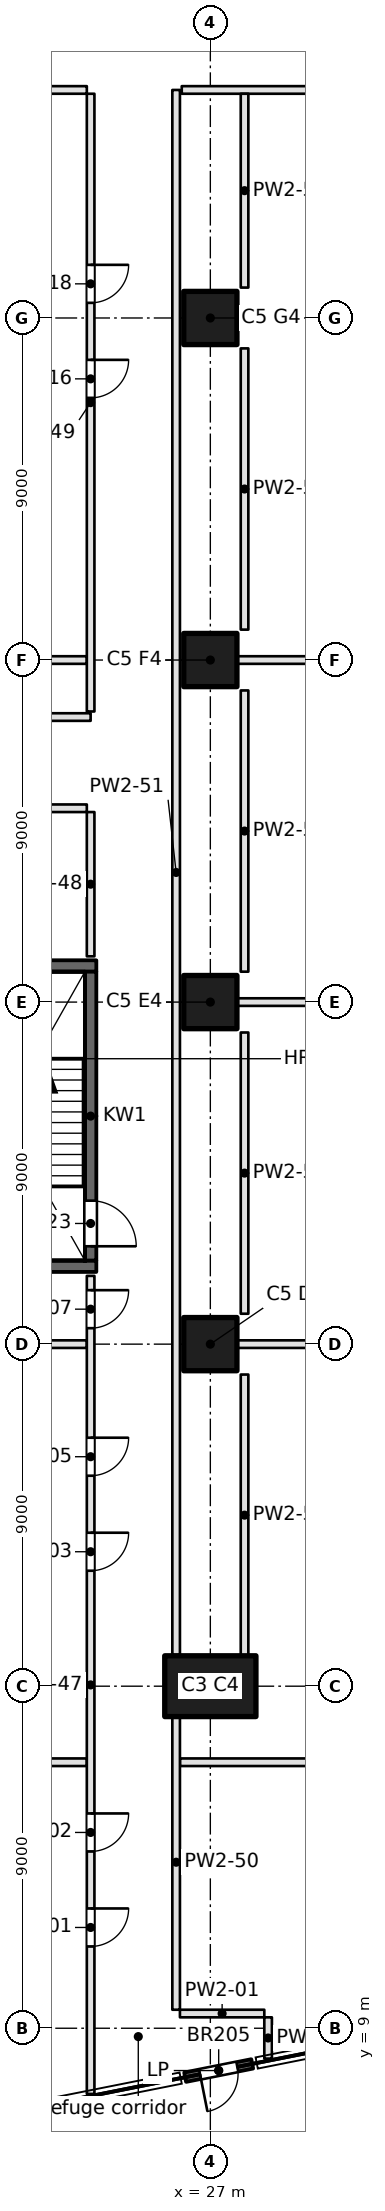
"""IFC4 building model, lengths in metres.
Left out: names, types, materials, properties, quantities, classifications, styles, units other than length and angle.
Written with IfcOpenShell. Run it as: python <this file> out.ifc"""

import sys

from ifc_helpers import new_model, si_unit, direction, frame, frame_2d, origin, origin_2d, place, context, subcontext, project, spatial, rectangle, extrude, element, fill, save


model = new_model("IFC4")
c1 = context("Model", 3, precision=1e-05, world=origin(), true_north=direction((0.0, 1.0)))
c2 = subcontext(c1, "Body", "Model", "MODEL_VIEW")
j1 = project(units=[si_unit("LENGTHUNIT", "METRE"), si_unit("PLANEANGLEUNIT", "RADIAN")], contexts=[c1])
p1 = place(None, origin())
s1 = spatial("IfcSite", under=j1, at=p1, CompositionType="ELEMENT")
p2 = place(p1, origin())
s2 = spatial("IfcBuilding", under=s1, at=p2, CompositionType="ELEMENT")
p3 = place(p2, frame((0.0, 0.0, 80.2)))
s3 = spatial("IfcBuildingStorey", under=s2, at=p3, CompositionType="ELEMENT", Elevation=80.2)
p4 = place(p3, frame((27.0, 18.0, 0.0), z_axis=(0.0, 0.0, 1.0), x_axis=(1.0, 0.0, 0.0)))
e1 = element("IfcColumn", 1, at=p4, inside=s3, PredefinedType="COLUMN", context=c2, shape_type="SweptSolid", body=[
    extrude(rectangle(XDim=2.4, YDim=1.6, at=origin_2d()), origin(), (0.0, 0.0, 1.0), 4.6),
])
for number, where, z_axis, x_axis in (
    (2, (27.0, 27.0, 0.0), (0.0, 0.0, 1.0), (1.0, 0.0, 0.0)),
    (3, (27.0, 36.0, 0.0), (0.0, 0.0, 1.0), (1.0, 0.0, 0.0)),
    (4, (27.0, 45.0, 0.0), (0.0, 0.0, 1.0), (1.0, 0.0, 0.0)),
    (5, (27.0, 54.0, 0.0), (0.0, 0.0, 1.0), (1.0, 0.0, 0.0)),
):
    element("IfcColumn", number, at=place(p3, frame(where, z_axis=z_axis, x_axis=x_axis)), inside=s3, PredefinedType="COLUMN", context=c2, shape_type="SweptSolid", body=[
        extrude(rectangle(XDim=1.4, YDim=1.4, at=origin_2d()), origin(), (0.0, 0.0, 1.0), 4.6),
    ])
p5 = place(p3, frame((26.337, 7.711, 0.0), z_axis=(0.0, 0.0, 1.0), x_axis=(0.98077319256, 0.195151081871, 0.0)))
e6 = element("IfcWall", 6, at=p5, inside=s3, PredefinedType="SOLIDWALL", context=c2, shape_type="SweptSolid", body=[
    extrude(rectangle(XDim=1.8, YDim=0.25, at=frame_2d((0.9, 0.0))), origin(), (0.0, 0.0, 1.0), 4.2),
])
p6 = place(p5, frame((0.4, 0.0, 0.0)))
e7 = element("IfcOpeningElement", 7, at=p6, cuts=e6, PredefinedType="OPENING", context=c2, shape_type="SweptSolid", body=[
    extrude(rectangle(XDim=1.0, YDim=2.1, at=frame_2d((0.5, 1.05))), frame((0.0, 0.125, 0.0), z_axis=(0.0, -1.0, 0.0), x_axis=(1.0, 0.0, 0.0)), (0.0, 0.0, 1.0), 0.25),
])
for number, where, z_axis, x_axis in (
    (8, (19.1, 29.05, -0.45), (0.0, 0.0, 1.0), (1.0, 0.0, 0.0)),
    (9, (19.1, 36.95, -0.45), (0.0, 0.0, 1.0), (1.0, 0.0, 0.0)),
):
    element("IfcWall", number, at=place(p3, frame(where, z_axis=z_axis, x_axis=x_axis)), inside=s3, PredefinedType="SOLIDWALL", context=c2, shape_type="SweptSolid", body=[
        extrude(rectangle(XDim=4.9, YDim=0.3, at=frame_2d((2.45, 0.0))), origin(), (0.0, 0.0, 1.0), 4.65),
    ])
p7 = place(p3, frame((23.85, 29.2, -0.45), z_axis=(0.0, 0.0, 1.0), x_axis=(0.0, 1.0, 0.0)))
e10 = element("IfcWall", 10, at=p7, inside=s3, PredefinedType="SOLIDWALL", context=c2, shape_type="SweptSolid", body=[
    extrude(rectangle(XDim=7.6, YDim=0.3, at=frame_2d((3.8, 0.0))), origin(), (0.0, 0.0, 1.0), 4.65),
])
p8 = place(p7, frame((0.375, 0.0, 0.45)))
e11 = element("IfcOpeningElement", 11, at=p8, cuts=e10, PredefinedType="OPENING", context=c2, shape_type="SweptSolid", body=[
    extrude(rectangle(XDim=1.2, YDim=2.1, at=frame_2d((0.6, 1.05))), frame((0.0, 0.15, 0.0), z_axis=(0.0, -1.0, 0.0), x_axis=(1.0, 0.0, 0.0)), (0.0, 0.0, 1.0), 0.3),
])
p9 = place(p3, frame((26.2, 9.387, 0.0), z_axis=(0.0, 0.0, 1.0), x_axis=(1.0, 0.0, 0.0)))
e12 = element("IfcWall", 12, at=p9, inside=s3, PredefinedType="PARTITIONING", context=c2, shape_type="SweptSolid", body=[
    extrude(rectangle(XDim=2.22, YDim=0.2, at=frame_2d((1.11, 0.0))), origin(), (0.0, 0.0, 1.0), 4.2),
])
p10 = place(p3, frame((9.162, 15.999, 0.0), z_axis=(0.0, 0.0, 1.0), x_axis=(1.0, 0.0, 0.0)))
e13 = element("IfcWall", 13, at=p10, inside=s3, PredefinedType="PARTITIONING", context=c2, shape_type="SweptSolid", body=[
    extrude(rectangle(XDim=14.588, YDim=0.2, at=frame_2d((7.294, 0.0))), origin(), (0.0, 0.0, 1.0), 4.2),
])
p11 = place(p3, frame((26.2, 15.999, 0.0), z_axis=(0.0, 0.0, 1.0), x_axis=(1.0, 0.0, 0.0)))
e14 = element("IfcWall", 14, at=p11, inside=s3, PredefinedType="PARTITIONING", context=c2, shape_type="SweptSolid", body=[
    extrude(rectangle(XDim=10.638, YDim=0.2, at=frame_2d((5.319, 0.0))), origin(), (0.0, 0.0, 1.0), 4.2),
])
p12 = place(p3, frame((18.65, 27.0, 0.0), z_axis=(0.0, 0.0, 1.0), x_axis=(1.0, 0.0, 0.0)))
e15 = element("IfcWall", 15, at=p12, inside=s3, PredefinedType="PARTITIONING", context=c2, shape_type="SweptSolid", body=[
    extrude(rectangle(XDim=5.1, YDim=0.2, at=frame_2d((2.55, 0.0))), origin(), (0.0, 0.0, 1.0), 4.2),
])
for number, where, z_axis, x_axis in (
    (16, (27.65, 27.0, 0.0), (0.0, 0.0, 1.0), (1.0, 0.0, 0.0)),
    (17, (27.65, 36.0, 0.0), (0.0, 0.0, 1.0), (1.0, 0.0, 0.0)),
):
    element("IfcWall", number, at=place(p3, frame(where, z_axis=z_axis, x_axis=x_axis)), inside=s3, PredefinedType="PARTITIONING", context=c2, shape_type="SweptSolid", body=[
        extrude(rectangle(XDim=7.7, YDim=0.2, at=frame_2d((3.85, 0.0))), origin(), (0.0, 0.0, 1.0), 4.2),
    ])
p13 = place(p3, frame((23.75, 41.1, 0.0), z_axis=(0.0, 0.0, 1.0), x_axis=(-1.0, 0.0, 0.0)))
e18 = element("IfcWall", 18, at=p13, inside=s3, PredefinedType="PARTITIONING", context=c2, shape_type="SweptSolid", body=[
    extrude(rectangle(XDim=14.65, YDim=0.2, at=frame_2d((7.325, 0.0))), origin(), (0.0, 0.0, 1.0), 4.2),
])
p14 = place(p13, frame((6.825, 0.0, 0.0)))
e19 = element("IfcOpeningElement", 19, at=p14, cuts=e18, PredefinedType="OPENING", context=c2, shape_type="SweptSolid", body=[
    extrude(rectangle(XDim=1.0, YDim=2.1, at=frame_2d((0.5, 1.05))), frame((0.0, 0.1, 0.0), z_axis=(0.0, -1.0, 0.0), x_axis=(1.0, 0.0, 0.0)), (0.0, 0.0, 1.0), 0.2),
])
p15 = place(p13, frame((4.325, 0.0, 0.0)))
e20 = element("IfcOpeningElement", 20, at=p15, cuts=e18, PredefinedType="OPENING", context=c2, shape_type="SweptSolid", body=[
    extrude(rectangle(XDim=1.0, YDim=2.1, at=frame_2d((0.5, 1.05))), frame((0.0, 0.1, 0.0), z_axis=(0.0, -1.0, 0.0), x_axis=(1.0, 0.0, 0.0)), (0.0, 0.0, 1.0), 0.2),
])
p16 = place(p3, frame((6.1, 43.5, 0.0), z_axis=(0.0, 0.0, 1.0), x_axis=(1.0, 0.0, 0.0)))
e21 = element("IfcWall", 21, at=p16, inside=s3, PredefinedType="PARTITIONING", context=c2, shape_type="SweptSolid", body=[
    extrude(rectangle(XDim=17.75, YDim=0.2, at=frame_2d((8.875, 0.0))), origin(), (0.0, 0.0, 1.0), 4.2),
])
p17 = place(p16, frame((5.875, 0.0, 0.0)))
e22 = element("IfcOpeningElement", 22, at=p17, cuts=e21, PredefinedType="OPENING", context=c2, shape_type="SweptSolid", body=[
    extrude(rectangle(XDim=1.0, YDim=2.1, at=frame_2d((0.5, 1.05))), frame((0.0, 0.1, 0.0), z_axis=(0.0, -1.0, 0.0), x_axis=(1.0, 0.0, 0.0)), (0.0, 0.0, 1.0), 0.2),
])
p18 = place(p16, frame((8.375, 0.0, 0.0)))
e23 = element("IfcOpeningElement", 23, at=p18, cuts=e21, PredefinedType="OPENING", context=c2, shape_type="SweptSolid", body=[
    extrude(rectangle(XDim=1.0, YDim=2.1, at=frame_2d((0.5, 1.05))), frame((0.0, 0.1, 0.0), z_axis=(0.0, -1.0, 0.0), x_axis=(1.0, 0.0, 0.0)), (0.0, 0.0, 1.0), 0.2),
])
p19 = place(p3, frame((18.65, 45.0, 0.0), z_axis=(0.0, 0.0, 1.0), x_axis=(1.0, 0.0, 0.0)))
e24 = element("IfcWall", 24, at=p19, inside=s3, PredefinedType="PARTITIONING", context=c2, shape_type="SweptSolid", body=[
    extrude(rectangle(XDim=5.1, YDim=0.2, at=frame_2d((2.55, 0.0))), origin(), (0.0, 0.0, 1.0), 4.2),
])
p20 = place(p3, frame((27.65, 45.0, 0.0), z_axis=(0.0, 0.0, 1.0), x_axis=(1.0, 0.0, 0.0)))
e25 = element("IfcWall", 25, at=p20, inside=s3, PredefinedType="PARTITIONING", context=c2, shape_type="SweptSolid", body=[
    extrude(rectangle(XDim=7.7, YDim=0.2, at=frame_2d((3.85, 0.0))), origin(), (0.0, 0.0, 1.0), 4.2),
])
p21 = place(p3, frame((23.75, 60.0, 0.0), z_axis=(0.0, 0.0, 1.0), x_axis=(-1.0, 0.0, 0.0)))
e26 = element("IfcWall", 26, at=p21, inside=s3, PredefinedType="PARTITIONING", context=c2, shape_type="SweptSolid", body=[
    extrude(rectangle(XDim=14.846, YDim=0.2, at=frame_2d((7.423, 0.0))), origin(), (0.0, 0.0, 1.0), 4.2),
])
p22 = place(p3, frame((40.1, 60.0, 0.0), z_axis=(0.0, 0.0, 1.0), x_axis=(-1.0, 0.0, 0.0)))
e27 = element("IfcWall", 27, at=p22, inside=s3, PredefinedType="PARTITIONING", context=c2, shape_type="SweptSolid", body=[
    extrude(rectangle(XDim=13.853, YDim=0.2, at=frame_2d((6.926, 0.0))), origin(), (0.0, 0.0, 1.0), 4.2),
])
p23 = place(p3, frame((23.85, 7.272, 0.0), z_axis=(0.0, 0.0, 1.0), x_axis=(0.0, 1.0, 0.0)))
e28 = element("IfcWall", 28, at=p23, inside=s3, PredefinedType="PARTITIONING", context=c2, shape_type="SweptSolid", body=[
    extrude(rectangle(XDim=21.524, YDim=0.2, at=frame_2d((10.762, 0.0))), origin(), (0.0, 0.0, 1.0), 4.2),
])
p24 = place(p23, frame((3.88, 0.0, 0.0)))
e29 = element("IfcOpeningElement", 29, at=p24, cuts=e28, PredefinedType="OPENING", context=c2, shape_type="SweptSolid", body=[
    extrude(rectangle(XDim=1.0, YDim=2.1, at=frame_2d((0.5, 1.05))), frame((0.0, 0.1, 0.0), z_axis=(0.0, -1.0, 0.0), x_axis=(1.0, 0.0, 0.0)), (0.0, 0.0, 1.0), 0.2),
])
p25 = place(p23, frame((6.38, 0.0, 0.0)))
e30 = element("IfcOpeningElement", 30, at=p25, cuts=e28, PredefinedType="OPENING", context=c2, shape_type="SweptSolid", body=[
    extrude(rectangle(XDim=1.0, YDim=2.1, at=frame_2d((0.5, 1.05))), frame((0.0, 0.1, 0.0), z_axis=(0.0, -1.0, 0.0), x_axis=(1.0, 0.0, 0.0)), (0.0, 0.0, 1.0), 0.2),
])
p26 = place(p23, frame((13.766, 0.0, 0.0)))
e31 = element("IfcOpeningElement", 31, at=p26, cuts=e28, PredefinedType="OPENING", context=c2, shape_type="SweptSolid", body=[
    extrude(rectangle(XDim=1.0, YDim=2.1, at=frame_2d((0.5, 1.05))), frame((0.0, 0.1, 0.0), z_axis=(0.0, -1.0, 0.0), x_axis=(1.0, 0.0, 0.0)), (0.0, 0.0, 1.0), 0.2),
])
p27 = place(p23, frame((16.266, 0.0, 0.0)))
e32 = element("IfcOpeningElement", 32, at=p27, cuts=e28, PredefinedType="OPENING", context=c2, shape_type="SweptSolid", body=[
    extrude(rectangle(XDim=1.0, YDim=2.1, at=frame_2d((0.5, 1.05))), frame((0.0, 0.1, 0.0), z_axis=(0.0, -1.0, 0.0), x_axis=(1.0, 0.0, 0.0)), (0.0, 0.0, 1.0), 0.2),
])
p28 = place(p23, frame((20.148, 0.0, 0.0)))
e33 = element("IfcOpeningElement", 33, at=p28, cuts=e28, PredefinedType="OPENING", context=c2, shape_type="SweptSolid", body=[
    extrude(rectangle(XDim=1.0, YDim=2.1, at=frame_2d((0.5, 1.05))), frame((0.0, 0.1, 0.0), z_axis=(0.0, -1.0, 0.0), x_axis=(1.0, 0.0, 0.0)), (0.0, 0.0, 1.0), 0.2),
])
p29 = place(p3, frame((23.85, 37.204, 0.0), z_axis=(0.0, 0.0, 1.0), x_axis=(0.0, 1.0, 0.0)))
e34 = element("IfcWall", 34, at=p29, inside=s3, PredefinedType="PARTITIONING", context=c2, shape_type="SweptSolid", body=[
    extrude(rectangle(XDim=3.796, YDim=0.2, at=frame_2d((1.898, 0.0))), origin(), (0.0, 0.0, 1.0), 4.2),
])
p30 = place(p3, frame((23.85, 43.646, 0.0), z_axis=(0.0, 0.0, 1.0), x_axis=(0.0, 1.0, 0.0)))
e35 = element("IfcWall", 35, at=p30, inside=s3, PredefinedType="PARTITIONING", context=c2, shape_type="SweptSolid", body=[
    extrude(rectangle(XDim=16.254, YDim=0.2, at=frame_2d((8.127, 0.0))), origin(), (0.0, 0.0, 1.0), 4.2),
])
p31 = place(p30, frame((8.252, 0.0, 0.0)))
e36 = element("IfcOpeningElement", 36, at=p31, cuts=e35, PredefinedType="OPENING", context=c2, shape_type="SweptSolid", body=[
    extrude(rectangle(XDim=1.0, YDim=2.1, at=frame_2d((0.5, 1.05))), frame((0.0, 0.1, 0.0), z_axis=(0.0, -1.0, 0.0), x_axis=(1.0, 0.0, 0.0)), (0.0, 0.0, 1.0), 0.2),
])
p32 = place(p30, frame((10.752, 0.0, 0.0)))
e37 = element("IfcOpeningElement", 37, at=p32, cuts=e35, PredefinedType="OPENING", context=c2, shape_type="SweptSolid", body=[
    extrude(rectangle(XDim=1.0, YDim=2.1, at=frame_2d((0.5, 1.05))), frame((0.0, 0.1, 0.0), z_axis=(0.0, -1.0, 0.0), x_axis=(1.0, 0.0, 0.0)), (0.0, 0.0, 1.0), 0.2),
])
p33 = place(p3, frame((26.1, 17.25, 0.0), z_axis=(0.0, 0.0, 1.0), x_axis=(0.0, -1.0, 0.0)))
e38 = element("IfcWall", 38, at=p33, inside=s3, PredefinedType="PARTITIONING", context=c2, shape_type="SweptSolid", body=[
    extrude(rectangle(XDim=7.763, YDim=0.2, at=frame_2d((3.881, 0.0))), origin(), (0.0, 0.0, 1.0), 4.2),
])
p34 = place(p3, frame((26.1, 60.0, 0.0), z_axis=(0.0, 0.0, 1.0), x_axis=(0.0, -1.0, 0.0)))
e39 = element("IfcWall", 39, at=p34, inside=s3, PredefinedType="PARTITIONING", context=c2, shape_type="SweptSolid", body=[
    extrude(rectangle(XDim=41.177, YDim=0.2, at=frame_2d((20.588, 0.0))), origin(), (0.0, 0.0, 1.0), 4.2),
])
for number, where, z_axis, x_axis in (
    (40, (27.9, 26.2, 0.0), (0.0, 0.0, 1.0), (0.0, -1.0, 0.0)),
    (41, (27.9, 35.2, 0.0), (0.0, 0.0, 1.0), (0.0, -1.0, 0.0)),
    (42, (27.9, 44.2, 0.0), (0.0, 0.0, 1.0), (0.0, -1.0, 0.0)),
    (43, (27.9, 53.2, 0.0), (0.0, 0.0, 1.0), (0.0, -1.0, 0.0)),
):
    element("IfcWall", number, at=place(p3, frame(where, z_axis=z_axis, x_axis=x_axis)), inside=s3, PredefinedType="PARTITIONING", context=c2, shape_type="SweptSolid", body=[
        extrude(rectangle(XDim=7.4, YDim=0.2, at=frame_2d((3.7, 0.0))), origin(), (0.0, 0.0, 1.0), 4.2),
    ])
p35 = place(p3, frame((27.9, 59.9, 0.0), z_axis=(0.0, 0.0, 1.0), x_axis=(0.0, -1.0, 0.0)))
e44 = element("IfcWall", 44, at=p35, inside=s3, PredefinedType="PARTITIONING", context=c2, shape_type="SweptSolid", body=[
    extrude(rectangle(XDim=5.1, YDim=0.2, at=frame_2d((2.55, 0.0))), origin(), (0.0, 0.0, 1.0), 4.2),
])
p36 = place(p3, frame((28.52, 9.287, 0.0), z_axis=(0.0, 0.0, 1.0), x_axis=(0.0, -1.0, 0.0)))
e45 = element("IfcWall", 45, at=p36, inside=s3, PredefinedType="PARTITIONING", context=c2, shape_type="SweptSolid", body=[
    extrude(rectangle(XDim=1.087, YDim=0.2, at=frame_2d((0.543, 0.0))), origin(), (0.0, 0.0, 1.0), 4.2),
])
p37 = place(p6, frame((1.0, 0.0, 0.0), z_axis=(0.0, 0.0, 1.0), x_axis=(-1.0, 0.0, 0.0)))
e46 = element("IfcDoor", 46, at=p37, inside=s3, OperationType="SINGLE_SWING_RIGHT", PredefinedType="DOOR", context=c2, shape_type="SweptSolid", body=[
    extrude(rectangle(XDim=1.0, YDim=2.1, at=frame_2d((0.5, 1.05))), frame((0.0, 0.025, 0.0), z_axis=(0.0, -1.0, 0.0), x_axis=(1.0, 0.0, 0.0)), (0.0, 0.0, 1.0), 0.05),
])
fill(e7, e46)
p38 = place(p8, frame((1.2, 0.0, 0.0), z_axis=(0.0, 0.0, 1.0), x_axis=(-1.0, 0.0, 0.0)))
e47 = element("IfcDoor", 47, at=p38, inside=s3, OperationType="SINGLE_SWING_RIGHT", PredefinedType="DOOR", context=c2, shape_type="SweptSolid", body=[
    extrude(rectangle(XDim=1.2, YDim=2.1, at=frame_2d((0.6, 1.05))), frame((0.0, 0.025, 0.0), z_axis=(0.0, -1.0, 0.0), x_axis=(1.0, 0.0, 0.0)), (0.0, 0.0, 1.0), 0.05),
])
fill(e11, e47)
p39 = place(p24, frame((1.0, 0.0, 0.0), z_axis=(0.0, 0.0, 1.0), x_axis=(-1.0, 0.0, 0.0)))
e48 = element("IfcDoor", 48, at=p39, inside=s3, OperationType="SINGLE_SWING_LEFT", PredefinedType="DOOR", context=c2, shape_type="SweptSolid", body=[
    extrude(rectangle(XDim=1.0, YDim=2.1, at=frame_2d((0.5, 1.05))), frame((0.0, 0.025, 0.0), z_axis=(0.0, -1.0, 0.0), x_axis=(1.0, 0.0, 0.0)), (0.0, 0.0, 1.0), 0.05),
])
fill(e29, e48)
p40 = place(p25, frame((1.0, 0.0, 0.0), z_axis=(0.0, 0.0, 1.0), x_axis=(-1.0, 0.0, 0.0)))
e49 = element("IfcDoor", 49, at=p40, inside=s3, OperationType="SINGLE_SWING_LEFT", PredefinedType="DOOR", context=c2, shape_type="SweptSolid", body=[
    extrude(rectangle(XDim=1.0, YDim=2.1, at=frame_2d((0.5, 1.05))), frame((0.0, 0.025, 0.0), z_axis=(0.0, -1.0, 0.0), x_axis=(1.0, 0.0, 0.0)), (0.0, 0.0, 1.0), 0.05),
])
fill(e30, e49)
p41 = place(p26, frame((1.0, 0.0, 0.0), z_axis=(0.0, 0.0, 1.0), x_axis=(-1.0, 0.0, 0.0)))
e50 = element("IfcDoor", 50, at=p41, inside=s3, OperationType="SINGLE_SWING_LEFT", PredefinedType="DOOR", context=c2, shape_type="SweptSolid", body=[
    extrude(rectangle(XDim=1.0, YDim=2.1, at=frame_2d((0.5, 1.05))), frame((0.0, 0.025, 0.0), z_axis=(0.0, -1.0, 0.0), x_axis=(1.0, 0.0, 0.0)), (0.0, 0.0, 1.0), 0.05),
])
fill(e31, e50)
p42 = place(p27, frame((1.0, 0.0, 0.0), z_axis=(0.0, 0.0, 1.0), x_axis=(-1.0, 0.0, 0.0)))
e51 = element("IfcDoor", 51, at=p42, inside=s3, OperationType="SINGLE_SWING_LEFT", PredefinedType="DOOR", context=c2, shape_type="SweptSolid", body=[
    extrude(rectangle(XDim=1.0, YDim=2.1, at=frame_2d((0.5, 1.05))), frame((0.0, 0.025, 0.0), z_axis=(0.0, -1.0, 0.0), x_axis=(1.0, 0.0, 0.0)), (0.0, 0.0, 1.0), 0.05),
])
fill(e32, e51)
p43 = place(p28, frame((1.0, 0.0, 0.0), z_axis=(0.0, 0.0, 1.0), x_axis=(-1.0, 0.0, 0.0)))
e52 = element("IfcDoor", 52, at=p43, inside=s3, OperationType="SINGLE_SWING_LEFT", PredefinedType="DOOR", context=c2, shape_type="SweptSolid", body=[
    extrude(rectangle(XDim=1.0, YDim=2.1, at=frame_2d((0.5, 1.05))), frame((0.0, 0.025, 0.0), z_axis=(0.0, -1.0, 0.0), x_axis=(1.0, 0.0, 0.0)), (0.0, 0.0, 1.0), 0.05),
])
fill(e33, e52)
p44 = place(p31, frame((1.0, 0.0, 0.0), z_axis=(0.0, 0.0, 1.0), x_axis=(-1.0, 0.0, 0.0)))
e53 = element("IfcDoor", 53, at=p44, inside=s3, OperationType="SINGLE_SWING_LEFT", PredefinedType="DOOR", context=c2, shape_type="SweptSolid", body=[
    extrude(rectangle(XDim=1.0, YDim=2.1, at=frame_2d((0.5, 1.05))), frame((0.0, 0.025, 0.0), z_axis=(0.0, -1.0, 0.0), x_axis=(1.0, 0.0, 0.0)), (0.0, 0.0, 1.0), 0.05),
])
fill(e36, e53)
p45 = place(p32, frame((1.0, 0.0, 0.0), z_axis=(0.0, 0.0, 1.0), x_axis=(-1.0, 0.0, 0.0)))
e54 = element("IfcDoor", 54, at=p45, inside=s3, OperationType="SINGLE_SWING_LEFT", PredefinedType="DOOR", context=c2, shape_type="SweptSolid", body=[
    extrude(rectangle(XDim=1.0, YDim=2.1, at=frame_2d((0.5, 1.05))), frame((0.0, 0.025, 0.0), z_axis=(0.0, -1.0, 0.0), x_axis=(1.0, 0.0, 0.0)), (0.0, 0.0, 1.0), 0.05),
])
fill(e37, e54)
save(model, sys.argv[1])
